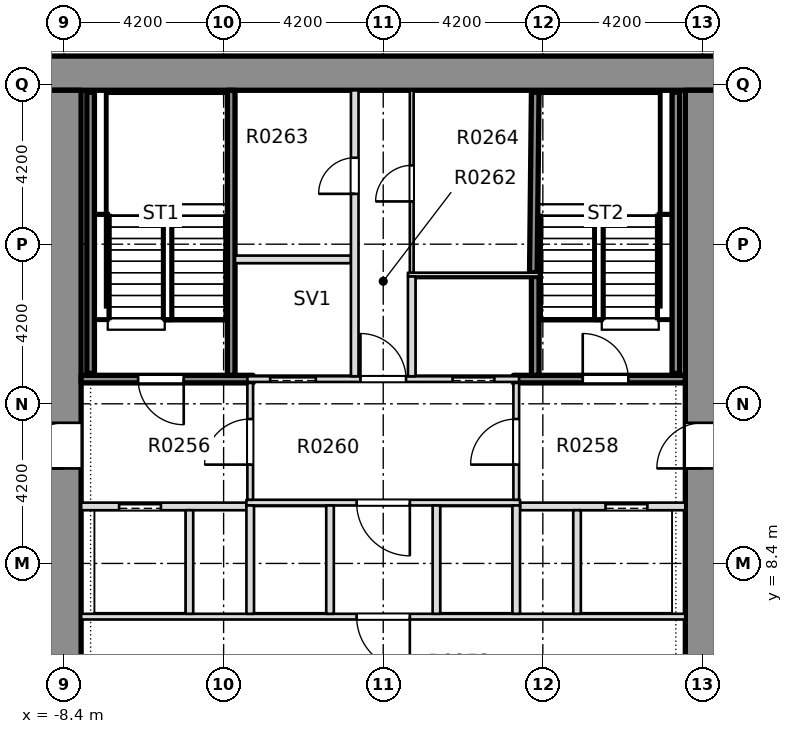
"""IFC4 building model, lengths in metres.
Left out: names, types, materials, properties, quantities, classifications, styles, units other than length and angle.
Written with IfcOpenShell. Run it as: python <this file> out.ifc"""

import sys

from ifc_helpers import new_model, si_unit, direction, frame, frame_2d, origin, place, context, subcontext, project, spatial, rectangle, extrude, element, fill, save


model = new_model("IFC4")
c1 = context("Model", 3, precision=1e-05, world=origin(), true_north=direction((0.0, 1.0)))
c2 = subcontext(c1, "Body", "Model", "MODEL_VIEW")
j1 = project(units=[si_unit("LENGTHUNIT", "METRE"), si_unit("PLANEANGLEUNIT", "RADIAN")], contexts=[c1])
p1 = place(None, origin())
s1 = spatial("IfcSite", under=j1, at=p1, CompositionType="ELEMENT")
p2 = place(p1, origin())
s2 = spatial("IfcBuilding", under=s1, at=p2, CompositionType="ELEMENT")
p3 = place(p2, frame((0.0, 0.0, 12.5)))
s3 = spatial("IfcBuildingStorey", under=s2, at=p3, CompositionType="ELEMENT", Elevation=12.5)
p4 = place(p3, frame((-11.7, 21.3, -0.4), z_axis=(0.0, 0.0, 1.0), x_axis=(1.0, 0.0, 0.0)))
e1 = element("IfcWall", 1, at=p4, inside=s3, PredefinedType="SOLIDWALL", context=c2, shape_type="SweptSolid", body=[
    extrude(rectangle(XDim=23.4, YDim=0.9, at=frame_2d((11.7, 0.0))), origin(), (0.0, 0.0, 1.0), 7.5),
])
p5 = place(p3, frame((-8.4, -7.5, -0.4), z_axis=(0.0, 0.0, 1.0), x_axis=(0.0, 1.0, 0.0)))
e2 = element("IfcWall", 2, at=p5, inside=s3, PredefinedType="SHEAR", context=c2, shape_type="SweptSolid", body=[
    extrude(rectangle(XDim=28.35, YDim=0.9, at=frame_2d((14.175, 0.0))), origin(), (0.0, 0.0, 1.0), 7.5),
])
p6 = place(p5, frame((18.4, 0.0, 0.4)))
e3 = element("IfcOpeningElement", 3, at=p6, cuts=e2, PredefinedType="OPENING", context=c2, shape_type="SweptSolid", body=[
    extrude(rectangle(XDim=1.2, YDim=2.1, at=frame_2d((0.6, 1.05))), frame((0.0, 0.46, 0.0), z_axis=(0.0, -1.0, 0.0), x_axis=(1.0, 0.0, 0.0)), (0.0, 0.0, 1.0), 0.92),
])
p7 = place(p3, frame((8.4, -7.5, -0.4), z_axis=(0.0, 0.0, 1.0), x_axis=(0.0, 1.0, 0.0)))
e4 = element("IfcWall", 4, at=p7, inside=s3, PredefinedType="SHEAR", context=c2, shape_type="SweptSolid", body=[
    extrude(rectangle(XDim=28.35, YDim=0.9, at=frame_2d((14.175, 0.0))), origin(), (0.0, 0.0, 1.0), 7.5),
])
p8 = place(p7, frame((18.4, 0.0, 0.4)))
e5 = element("IfcOpeningElement", 5, at=p8, cuts=e4, PredefinedType="OPENING", context=c2, shape_type="SweptSolid", body=[
    extrude(rectangle(XDim=1.2, YDim=2.1, at=frame_2d((0.6, 1.05))), frame((0.0, 0.46, 0.0), z_axis=(0.0, -1.0, 0.0), x_axis=(1.0, 0.0, 0.0)), (0.0, 0.0, 1.0), 0.92),
])
p9 = place(p3, frame((-7.949, 7.0, 0.0), z_axis=(0.0, 0.0, 1.0), x_axis=(1.0, 0.0, 0.0)))
e6 = element("IfcWall", 6, at=p9, inside=s3, PredefinedType="PARTITIONING", context=c2, shape_type="SweptSolid", body=[
    extrude(rectangle(XDim=15.898, YDim=0.15, at=frame_2d((7.949, 0.0))), origin(), (0.0, 0.0, 1.0), 7.1),
])
p10 = place(p9, frame((7.249, 0.0, 0.0)))
e7 = element("IfcOpeningElement", 7, at=p10, cuts=e6, PredefinedType="OPENING", context=c2, shape_type="SweptSolid", body=[
    extrude(rectangle(XDim=1.4, YDim=2.1, at=frame_2d((0.7, 1.05))), frame((0.0, 0.085, 0.0), z_axis=(0.0, -1.0, 0.0), x_axis=(1.0, 0.0, 0.0)), (0.0, 0.0, 1.0), 0.17),
])
p11 = place(p3, frame((-7.949, 9.9, 0.0), z_axis=(0.0, 0.0, 1.0), x_axis=(1.0, 0.0, 0.0)))
e8 = element("IfcWall", 8, at=p11, inside=s3, PredefinedType="PARTITIONING", context=c2, shape_type="SweptSolid", body=[
    extrude(rectangle(XDim=4.349, YDim=0.2, at=frame_2d((2.174, 0.0))), origin(), (0.0, 0.0, 1.0), 7.1),
])
p12 = place(p11, frame((0.999, 0.0, 0.0)))
e9 = element("IfcOpeningElement", 9, at=p12, cuts=e8, PredefinedType="OPENING", context=c2, shape_type="SweptSolid", body=[
    extrude(rectangle(XDim=1.1, YDim=2.1, at=frame_2d((0.55, 1.05))), frame((0.0, 0.11, 0.0), z_axis=(0.0, -1.0, 0.0), x_axis=(1.0, 0.0, 0.0)), (0.0, 0.0, 1.0), 0.22),
])
p13 = place(p3, frame((3.6, 9.9, 0.0), z_axis=(0.0, 0.0, 1.0), x_axis=(1.0, 0.0, 0.0)))
e10 = element("IfcWall", 10, at=p13, inside=s3, PredefinedType="PARTITIONING", context=c2, shape_type="SweptSolid", body=[
    extrude(rectangle(XDim=4.349, YDim=0.2, at=frame_2d((2.174, 0.0))), origin(), (0.0, 0.0, 1.0), 7.1),
])
p14 = place(p13, frame((2.25, 0.0, 0.0)))
e11 = element("IfcOpeningElement", 11, at=p14, cuts=e10, PredefinedType="OPENING", context=c2, shape_type="SweptSolid", body=[
    extrude(rectangle(XDim=1.1, YDim=2.1, at=frame_2d((0.55, 1.05))), frame((0.0, 0.11, 0.0), z_axis=(0.0, -1.0, 0.0), x_axis=(1.0, 0.0, 0.0)), (0.0, 0.0, 1.0), 0.22),
])
p15 = place(p3, frame((-3.6, 10.0, 0.0), z_axis=(0.0, 0.0, 1.0), x_axis=(1.0, 0.0, 0.0)))
e12 = element("IfcWall", 12, at=p15, inside=s3, PredefinedType="PARTITIONING", context=c2, shape_type="SweptSolid", body=[
    extrude(rectangle(XDim=7.2, YDim=0.15, at=frame_2d((3.6, 0.0))), origin(), (0.0, 0.0, 1.0), 7.1),
])
p16 = place(p15, frame((2.9, 0.0, 0.0)))
e13 = element("IfcOpeningElement", 13, at=p16, cuts=e12, PredefinedType="OPENING", context=c2, shape_type="SweptSolid", body=[
    extrude(rectangle(XDim=1.4, YDim=2.1, at=frame_2d((0.7, 1.05))), frame((0.0, 0.085, 0.0), z_axis=(0.0, -1.0, 0.0), x_axis=(1.0, 0.0, 0.0)), (0.0, 0.0, 1.0), 0.17),
])
p17 = place(p3, frame((-7.949, 13.25, 0.0), z_axis=(0.0, 0.0, 1.0), x_axis=(1.0, 0.0, 0.0)))
e14 = element("IfcWall", 14, at=p17, inside=s3, PredefinedType="SOLIDWALL", context=c2, shape_type="SweptSolid", body=[
    extrude(rectangle(XDim=4.524, YDim=0.2, at=frame_2d((2.262, 0.0))), origin(), (0.0, 0.0, 1.0), 7.1),
])
p18 = place(p17, frame((1.499, 0.0, 0.0)))
e15 = element("IfcOpeningElement", 15, at=p18, cuts=e14, PredefinedType="OPENING", context=c2, shape_type="SweptSolid", body=[
    extrude(rectangle(XDim=1.2, YDim=2.1, at=frame_2d((0.6, 1.05))), frame((0.0, 0.11, 0.0), z_axis=(0.0, -1.0, 0.0), x_axis=(1.0, 0.0, 0.0)), (0.0, 0.0, 1.0), 0.22),
])
p19 = place(p3, frame((-3.575, 13.25, 0.0), z_axis=(0.0, 0.0, 1.0), x_axis=(1.0, 0.0, 0.0)))
e16 = element("IfcWall", 16, at=p19, inside=s3, PredefinedType="PARTITIONING", context=c2, shape_type="SweptSolid", body=[
    extrude(rectangle(XDim=7.15, YDim=0.15, at=frame_2d((3.575, 0.0))), origin(), (0.0, 0.0, 1.0), 7.1),
])
p20 = place(p19, frame((0.6, 0.0, 0.0)))
e17 = element("IfcOpeningElement", 17, at=p20, cuts=e16, PredefinedType="OPENING", context=c2, shape_type="SweptSolid", body=[
    extrude(rectangle(XDim=1.2, YDim=2.1, at=frame_2d((0.6, 1.05))), frame((0.0, 0.085, 0.0), z_axis=(0.0, -1.0, 0.0), x_axis=(1.0, 0.0, 0.0)), (0.0, 0.0, 1.0), 0.17),
])
p21 = place(p19, frame((5.4, 0.0, 0.0)))
e18 = element("IfcOpeningElement", 18, at=p21, cuts=e16, PredefinedType="OPENING", context=c2, shape_type="SweptSolid", body=[
    extrude(rectangle(XDim=1.1, YDim=2.1, at=frame_2d((0.55, 1.05))), frame((0.0, 0.085, 0.0), z_axis=(0.0, -1.0, 0.0), x_axis=(1.0, 0.0, 0.0)), (0.0, 0.0, 1.0), 0.17),
])
p22 = place(p19, frame((2.975, 0.0, 0.0)))
e19 = element("IfcOpeningElement", 19, at=p22, cuts=e16, PredefinedType="OPENING", context=c2, shape_type="SweptSolid", body=[
    extrude(rectangle(XDim=1.2, YDim=2.1, at=frame_2d((0.6, 1.05))), frame((0.0, 0.085, 0.0), z_axis=(0.0, -1.0, 0.0), x_axis=(1.0, 0.0, 0.0)), (0.0, 0.0, 1.0), 0.17),
])
p23 = place(p3, frame((3.425, 13.25, 0.0), z_axis=(0.0, 0.0, 1.0), x_axis=(1.0, 0.0, 0.0)))
e20 = element("IfcWall", 20, at=p23, inside=s3, PredefinedType="SOLIDWALL", context=c2, shape_type="SweptSolid", body=[
    extrude(rectangle(XDim=4.524, YDim=0.2, at=frame_2d((2.262, 0.0))), origin(), (0.0, 0.0, 1.0), 7.1),
])
p24 = place(p23, frame((1.825, 0.0, 0.0)))
e21 = element("IfcOpeningElement", 21, at=p24, cuts=e20, PredefinedType="OPENING", context=c2, shape_type="SweptSolid", body=[
    extrude(rectangle(XDim=1.2, YDim=2.1, at=frame_2d((0.6, 1.05))), frame((0.0, 0.11, 0.0), z_axis=(0.0, -1.0, 0.0), x_axis=(1.0, 0.0, 0.0)), (0.0, 0.0, 1.0), 0.22),
])
p25 = place(p3, frame((0.65, 16.0, 0.0), z_axis=(0.0, 0.0, 1.0), x_axis=(1.0, 0.0, 0.0)))
e22 = element("IfcWall", 22, at=p25, inside=s3, PredefinedType="PARTITIONING", context=c2, shape_type="SweptSolid", body=[
    extrude(rectangle(XDim=3.45, YDim=0.1, at=frame_2d((1.725, 0.0))), origin(), (0.0, 0.0, 1.0), 7.1),
])
p26 = place(p3, frame((-3.9, 16.4, 0.0), z_axis=(0.0, 0.0, 1.0), x_axis=(1.0, 0.0, 0.0)))
e23 = element("IfcWall", 23, at=p26, inside=s3, PredefinedType="PARTITIONING", context=c2, shape_type="SweptSolid", body=[
    extrude(rectangle(XDim=3.05, YDim=0.2, at=frame_2d((1.525, 0.0))), origin(), (0.0, 0.0, 1.0), 7.1),
])
p27 = place(p3, frame((-5.1, 7.075, 0.0), z_axis=(0.0, 0.0, 1.0), x_axis=(0.0, 1.0, 0.0)))
e24 = element("IfcWall", 24, at=p27, inside=s3, PredefinedType="PARTITIONING", context=c2, shape_type="SweptSolid", body=[
    extrude(rectangle(XDim=2.725, YDim=0.2, at=frame_2d((1.363, 0.0))), origin(), (0.0, 0.0, 1.0), 7.1),
])
p28 = place(p3, frame((-4.0, 13.35, 0.0), z_axis=(0.0, 0.0, 1.0), x_axis=(0.0, 1.0, 0.0)))
e25 = element("IfcWall", 25, at=p28, inside=s3, PredefinedType="SOLIDWALL", context=c2, shape_type="SweptSolid", body=[
    extrude(rectangle(XDim=7.499, YDim=0.2, at=frame_2d((3.75, 0.0))), origin(), (0.0, 0.0, 1.0), 7.1),
])
p29 = place(p3, frame((-3.5, 7.075, 0.0), z_axis=(0.0, 0.0, 1.0), x_axis=(0.0, 1.0, 0.0)))
e26 = element("IfcWall", 26, at=p29, inside=s3, PredefinedType="PARTITIONING", context=c2, shape_type="SweptSolid", body=[
    extrude(rectangle(XDim=2.85, YDim=0.2, at=frame_2d((1.425, 0.0))), origin(), (0.0, 0.0, 1.0), 7.1),
])
p30 = place(p3, frame((-3.5, 10.075, 0.0), z_axis=(0.0, 0.0, 1.0), x_axis=(0.0, 1.0, 0.0)))
e27 = element("IfcWall", 27, at=p30, inside=s3, PredefinedType="PARTITIONING", context=c2, shape_type="SweptSolid", body=[
    extrude(rectangle(XDim=3.075, YDim=0.15, at=frame_2d((1.538, 0.0))), origin(), (0.0, 0.0, 1.0), 7.1),
])
p31 = place(p30, frame((0.925, 0.0, 0.0)))
e28 = element("IfcOpeningElement", 28, at=p31, cuts=e27, PredefinedType="OPENING", context=c2, shape_type="SweptSolid", body=[
    extrude(rectangle(XDim=1.2, YDim=2.1, at=frame_2d((0.6, 1.05))), frame((0.0, 0.085, 0.0), z_axis=(0.0, -1.0, 0.0), x_axis=(1.0, 0.0, 0.0)), (0.0, 0.0, 1.0), 0.17),
])
p32 = place(p3, frame((-1.4, 7.075, 0.0), z_axis=(0.0, 0.0, 1.0), x_axis=(0.0, 1.0, 0.0)))
e29 = element("IfcWall", 29, at=p32, inside=s3, PredefinedType="PARTITIONING", context=c2, shape_type="SweptSolid", body=[
    extrude(rectangle(XDim=2.85, YDim=0.2, at=frame_2d((1.425, 0.0))), origin(), (0.0, 0.0, 1.0), 7.1),
])
p33 = place(p3, frame((-0.75, 13.325, 0.0), z_axis=(0.0, 0.0, 1.0), x_axis=(0.0, 1.0, 0.0)))
e30 = element("IfcWall", 30, at=p33, inside=s3, PredefinedType="PARTITIONING", context=c2, shape_type="SweptSolid", body=[
    extrude(rectangle(XDim=7.524, YDim=0.2, at=frame_2d((3.762, 0.0))), origin(), (0.0, 0.0, 1.0), 7.1),
])
p34 = place(p33, frame((4.8, 0.0, 0.0)))
e31 = element("IfcOpeningElement", 31, at=p34, cuts=e30, PredefinedType="OPENING", context=c2, shape_type="SweptSolid", body=[
    extrude(rectangle(XDim=0.95, YDim=2.1, at=frame_2d((0.475, 1.05))), frame((0.0, 0.11, 0.0), z_axis=(0.0, -1.0, 0.0), x_axis=(1.0, 0.0, 0.0)), (0.0, 0.0, 1.0), 0.22),
])
p35 = place(p3, frame((0.75, 13.325, 0.0), z_axis=(0.0, 0.0, 1.0), x_axis=(0.0, 1.0, 0.0)))
e32 = element("IfcWall", 32, at=p35, inside=s3, PredefinedType="PARTITIONING", context=c2, shape_type="SweptSolid", body=[
    extrude(rectangle(XDim=2.625, YDim=0.2, at=frame_2d((1.312, 0.0))), origin(), (0.0, 0.0, 1.0), 7.1),
])
p36 = place(p3, frame((0.75, 16.05, 0.0), z_axis=(0.0, 0.0, 1.0), x_axis=(0.0, 1.0, 0.0)))
e33 = element("IfcWall", 33, at=p36, inside=s3, PredefinedType="PARTITIONING", context=c2, shape_type="SweptSolid", body=[
    extrude(rectangle(XDim=4.799, YDim=0.1, at=frame_2d((2.399, 0.0))), origin(), (0.0, 0.0, 1.0), 7.1),
])
p37 = place(p36, frame((1.875, 0.0, 0.0)))
e34 = element("IfcOpeningElement", 34, at=p37, cuts=e33, PredefinedType="OPENING", context=c2, shape_type="SweptSolid", body=[
    extrude(rectangle(XDim=0.95, YDim=2.1, at=frame_2d((0.475, 1.05))), frame((0.0, 0.06, 0.0), z_axis=(0.0, -1.0, 0.0), x_axis=(1.0, 0.0, 0.0)), (0.0, 0.0, 1.0), 0.12),
])
for number, where, z_axis, x_axis in (
    (35, (1.4, 7.075, 0.0), (0.0, 0.0, 1.0), (0.0, 1.0, 0.0)),
    (36, (3.5, 7.075, 0.0), (0.0, 0.0, 1.0), (0.0, 1.0, 0.0)),
):
    element("IfcWall", number, at=place(p3, frame(where, z_axis=z_axis, x_axis=x_axis)), inside=s3, PredefinedType="PARTITIONING", context=c2, shape_type="SweptSolid", body=[
        extrude(rectangle(XDim=2.85, YDim=0.2, at=frame_2d((1.425, 0.0))), origin(), (0.0, 0.0, 1.0), 7.1),
    ])
p38 = place(p3, frame((3.5, 10.075, 0.0), z_axis=(0.0, 0.0, 1.0), x_axis=(0.0, 1.0, 0.0)))
e37 = element("IfcWall", 37, at=p38, inside=s3, PredefinedType="PARTITIONING", context=c2, shape_type="SweptSolid", body=[
    extrude(rectangle(XDim=3.075, YDim=0.15, at=frame_2d((1.538, 0.0))), origin(), (0.0, 0.0, 1.0), 7.1),
])
p39 = place(p38, frame((0.925, 0.0, 0.0)))
e38 = element("IfcOpeningElement", 38, at=p39, cuts=e37, PredefinedType="OPENING", context=c2, shape_type="SweptSolid", body=[
    extrude(rectangle(XDim=1.2, YDim=2.1, at=frame_2d((0.6, 1.05))), frame((0.0, 0.085, 0.0), z_axis=(0.0, -1.0, 0.0), x_axis=(1.0, 0.0, 0.0)), (0.0, 0.0, 1.0), 0.17),
])
p40 = place(p3, frame((4.0, 13.35, 0.0), z_axis=(0.0, 0.0, 1.0), x_axis=(0.0, 1.0, 0.0)))
e39 = element("IfcWall", 39, at=p40, inside=s3, PredefinedType="SOLIDWALL", context=c2, shape_type="SweptSolid", body=[
    extrude(rectangle(XDim=2.6, YDim=0.2, at=frame_2d((1.3, 0.0))), origin(), (0.0, 0.0, 1.0), 7.1),
])
p41 = place(p3, frame((3.95, 16.05, 0.0), z_axis=(0.0, 0.0, 1.0), x_axis=(0.010538176883, 0.999944471872, 0.0)))
e40 = element("IfcWall", 40, at=p41, inside=s3, PredefinedType="SOLIDWALL", context=c2, shape_type="SweptSolid", body=[
    extrude(rectangle(XDim=4.749, YDim=0.2, at=frame_2d((2.375, 0.0))), origin(), (0.0, 0.0, 1.0), 7.1),
])
p42 = place(p3, frame((5.1, 7.075, 0.0), z_axis=(0.0, 0.0, 1.0), x_axis=(0.0, 1.0, 0.0)))
e41 = element("IfcWall", 41, at=p42, inside=s3, PredefinedType="PARTITIONING", context=c2, shape_type="SweptSolid", body=[
    extrude(rectangle(XDim=2.725, YDim=0.2, at=frame_2d((1.363, 0.0))), origin(), (0.0, 0.0, 1.0), 7.1),
])
for number, where, z_axis, x_axis in (
    (42, (-7.7, 13.4, 0.0), (0.0, 0.0, 1.0), (0.0, 1.0, 0.0)),
    (43, (7.7, 13.4, 0.0), (0.0, 0.0, 1.0), (0.0, 1.0, 0.0)),
):
    element("IfcWall", number, at=place(p3, frame(where, z_axis=z_axis, x_axis=x_axis)), inside=s3, PredefinedType="SOLIDWALL", context=c2, shape_type="SweptSolid", body=[
        extrude(rectangle(XDim=7.4, YDim=0.2, at=frame_2d((3.7, 0.0))), origin(), (0.0, 0.0, 1.0), 7.1),
    ])
p43 = place(p18, origin())
e44 = element("IfcDoor", 44, at=p43, inside=s3, OperationType="SINGLE_SWING_LEFT", PredefinedType="DOOR", context=c2, shape_type="SweptSolid", body=[
    extrude(rectangle(XDim=1.2, YDim=2.1, at=frame_2d((0.6, 1.05))), frame((0.0, 0.025, 0.0), z_axis=(0.0, -1.0, 0.0), x_axis=(1.0, 0.0, 0.0)), (0.0, 0.0, 1.0), 0.05),
])
fill(e15, e44)
p44 = place(p12, origin())
e45 = element("IfcDoor", 45, at=p44, inside=s3, OperationType="SLIDING_TO_RIGHT", PredefinedType="DOOR", context=c2, shape_type="SweptSolid", body=[
    extrude(rectangle(XDim=1.1, YDim=2.1, at=frame_2d((0.55, 1.05))), frame((0.0, 0.025, 0.0), z_axis=(0.0, -1.0, 0.0), x_axis=(1.0, 0.0, 0.0)), (0.0, 0.0, 1.0), 0.05),
])
fill(e9, e45)
p45 = place(p24, origin())
e46 = element("IfcDoor", 46, at=p45, inside=s3, OperationType="SINGLE_SWING_RIGHT", PredefinedType="DOOR", context=c2, shape_type="SweptSolid", body=[
    extrude(rectangle(XDim=1.2, YDim=2.1, at=frame_2d((0.6, 1.05))), frame((0.0, 0.025, 0.0), z_axis=(0.0, -1.0, 0.0), x_axis=(1.0, 0.0, 0.0)), (0.0, 0.0, 1.0), 0.05),
])
fill(e21, e46)
p46 = place(p14, origin())
e47 = element("IfcDoor", 47, at=p46, inside=s3, OperationType="SLIDING_TO_LEFT", PredefinedType="DOOR", context=c2, shape_type="SweptSolid", body=[
    extrude(rectangle(XDim=1.1, YDim=2.1, at=frame_2d((0.55, 1.05))), frame((0.0, 0.025, 0.0), z_axis=(0.0, -1.0, 0.0), x_axis=(1.0, 0.0, 0.0)), (0.0, 0.0, 1.0), 0.05),
])
fill(e11, e47)
p47 = place(p10, origin())
e48 = element("IfcDoor", 48, at=p47, inside=s3, OperationType="SINGLE_SWING_RIGHT", PredefinedType="DOOR", context=c2, shape_type="SweptSolid", body=[
    extrude(rectangle(XDim=1.4, YDim=2.1, at=frame_2d((0.7, 1.05))), frame((0.0, 0.025, 0.0), z_axis=(0.0, -1.0, 0.0), x_axis=(1.0, 0.0, 0.0)), (0.0, 0.0, 1.0), 0.05),
])
fill(e7, e48)
p48 = place(p16, origin())
e49 = element("IfcDoor", 49, at=p48, inside=s3, OperationType="SINGLE_SWING_RIGHT", PredefinedType="DOOR", context=c2, shape_type="SweptSolid", body=[
    extrude(rectangle(XDim=1.4, YDim=2.1, at=frame_2d((0.7, 1.05))), frame((0.0, 0.025, 0.0), z_axis=(0.0, -1.0, 0.0), x_axis=(1.0, 0.0, 0.0)), (0.0, 0.0, 1.0), 0.05),
])
fill(e13, e49)
p49 = place(p20, origin())
e50 = element("IfcDoor", 50, at=p49, inside=s3, OperationType="SLIDING_TO_RIGHT", PredefinedType="DOOR", context=c2, shape_type="SweptSolid", body=[
    extrude(rectangle(XDim=1.2, YDim=2.1, at=frame_2d((0.6, 1.05))), frame((0.0, 0.025, 0.0), z_axis=(0.0, -1.0, 0.0), x_axis=(1.0, 0.0, 0.0)), (0.0, 0.0, 1.0), 0.05),
])
fill(e17, e50)
p50 = place(p21, origin())
e51 = element("IfcDoor", 51, at=p50, inside=s3, OperationType="SLIDING_TO_LEFT", PredefinedType="DOOR", context=c2, shape_type="SweptSolid", body=[
    extrude(rectangle(XDim=1.1, YDim=2.1, at=frame_2d((0.55, 1.05))), frame((0.0, 0.025, 0.0), z_axis=(0.0, -1.0, 0.0), x_axis=(1.0, 0.0, 0.0)), (0.0, 0.0, 1.0), 0.05),
])
fill(e18, e51)
p51 = place(p22, origin())
e52 = element("IfcDoor", 52, at=p51, inside=s3, OperationType="SINGLE_SWING_RIGHT", PredefinedType="DOOR", context=c2, shape_type="SweptSolid", body=[
    extrude(rectangle(XDim=1.2, YDim=2.1, at=frame_2d((0.6, 1.05))), frame((0.0, 0.025, 0.0), z_axis=(0.0, -1.0, 0.0), x_axis=(1.0, 0.0, 0.0)), (0.0, 0.0, 1.0), 0.05),
])
fill(e19, e52)
p52 = place(p34, origin())
e53 = element("IfcDoor", 53, at=p52, inside=s3, OperationType="SINGLE_SWING_RIGHT", PredefinedType="DOOR", context=c2, shape_type="SweptSolid", body=[
    extrude(rectangle(XDim=0.95, YDim=2.1, at=frame_2d((0.475, 1.05))), frame((0.0, 0.025, 0.0), z_axis=(0.0, -1.0, 0.0), x_axis=(1.0, 0.0, 0.0)), (0.0, 0.0, 1.0), 0.05),
])
fill(e31, e53)
p53 = place(p37, origin())
e54 = element("IfcDoor", 54, at=p53, inside=s3, OperationType="SINGLE_SWING_LEFT", PredefinedType="DOOR", context=c2, shape_type="SweptSolid", body=[
    extrude(rectangle(XDim=0.95, YDim=2.1, at=frame_2d((0.475, 1.05))), frame((0.0, 0.025, 0.0), z_axis=(0.0, -1.0, 0.0), x_axis=(1.0, 0.0, 0.0)), (0.0, 0.0, 1.0), 0.05),
])
fill(e34, e54)
p54 = place(p31, origin())
e55 = element("IfcDoor", 55, at=p54, inside=s3, OperationType="SINGLE_SWING_RIGHT", PredefinedType="DOOR", context=c2, shape_type="SweptSolid", body=[
    extrude(rectangle(XDim=1.2, YDim=2.1, at=frame_2d((0.6, 1.05))), frame((0.0, 0.025, 0.0), z_axis=(0.0, -1.0, 0.0), x_axis=(1.0, 0.0, 0.0)), (0.0, 0.0, 1.0), 0.05),
])
fill(e28, e55)
p55 = place(p39, origin())
e56 = element("IfcDoor", 56, at=p55, inside=s3, OperationType="SINGLE_SWING_LEFT", PredefinedType="DOOR", context=c2, shape_type="SweptSolid", body=[
    extrude(rectangle(XDim=1.2, YDim=2.1, at=frame_2d((0.6, 1.05))), frame((0.0, 0.025, 0.0), z_axis=(0.0, -1.0, 0.0), x_axis=(1.0, 0.0, 0.0)), (0.0, 0.0, 1.0), 0.05),
])
fill(e38, e56)
p56 = place(p6, origin())
e57 = element("IfcDoor", 57, at=p56, inside=s3, OperationType="SINGLE_SWING_LEFT", PredefinedType="DOOR", context=c2, shape_type="SweptSolid", body=[
    extrude(rectangle(XDim=1.2, YDim=2.1, at=frame_2d((0.6, 1.05))), frame((0.0, 0.025, 0.0), z_axis=(0.0, -1.0, 0.0), x_axis=(1.0, 0.0, 0.0)), (0.0, 0.0, 1.0), 0.05),
])
fill(e3, e57)
p57 = place(p8, origin())
e58 = element("IfcDoor", 58, at=p57, inside=s3, OperationType="SINGLE_SWING_LEFT", PredefinedType="DOOR", context=c2, shape_type="SweptSolid", body=[
    extrude(rectangle(XDim=1.2, YDim=2.1, at=frame_2d((0.6, 1.05))), frame((0.0, 0.025, 0.0), z_axis=(0.0, -1.0, 0.0), x_axis=(1.0, 0.0, 0.0)), (0.0, 0.0, 1.0), 0.05),
])
fill(e5, e58)
save(model, sys.argv[1])
